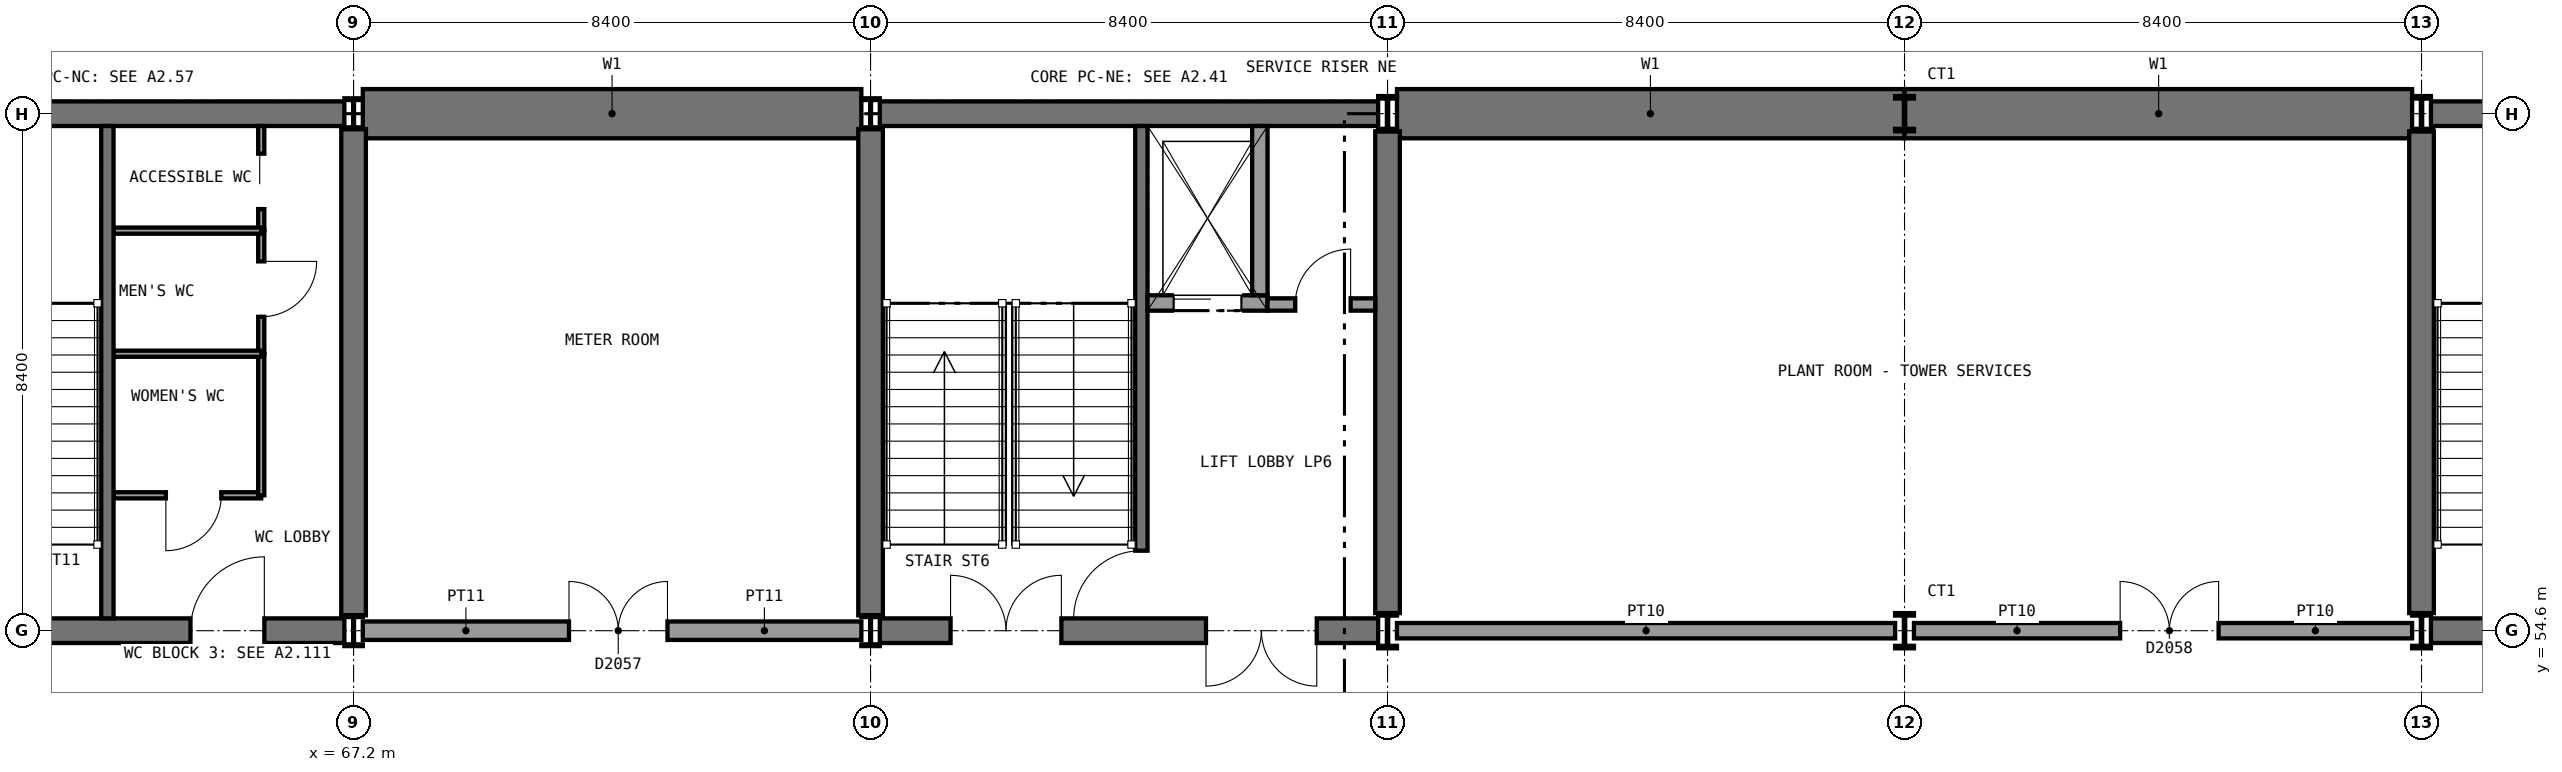
"""IFC4 building model, lengths in metres.
Left out: names, types, materials, properties, quantities, classifications, styles, units other than length and angle.
Written with IfcOpenShell. Run it as: python <this file> out.ifc"""

import sys

from ifc_helpers import new_model, si_unit, direction, frame, frame_2d, origin, origin_2d, place, context, subcontext, project, spatial, rectangle, i_section, extrude, element, fill, save


model = new_model("IFC4")
c1 = context("Model", 3, precision=1e-05, world=origin(), true_north=direction((0.0, 1.0)))
c2 = subcontext(c1, "Body", "Model", "MODEL_VIEW")
j1 = project(units=[si_unit("LENGTHUNIT", "METRE"), si_unit("PLANEANGLEUNIT", "RADIAN")], contexts=[c1])
p1 = place(None, origin())
s1 = spatial("IfcSite", under=j1, at=p1, CompositionType="ELEMENT")
p2 = place(p1, origin())
s2 = spatial("IfcBuilding", under=s1, at=p2, CompositionType="ELEMENT")
p3 = place(p2, frame((0.0, 0.0, -9.9)))
s3 = spatial("IfcBuildingStorey", under=s2, at=p3, CompositionType="ELEMENT", Elevation=-9.9)
p4 = place(p3, frame((67.35, 63.0, 0.0), z_axis=(0.0, 0.0, 1.0), x_axis=(1.0, 0.0, 0.0)))
e1 = element("IfcWall", 1, at=p4, inside=s3, PredefinedType="SOLIDWALL", context=c2, shape_type="SweptSolid", body=[
    extrude(rectangle(XDim=8.1, YDim=0.8, at=frame_2d((4.05, 0.0))), origin(), (0.0, 0.0, 1.0), 4.65),
])
p5 = place(p3, frame((84.153, 63.0, 0.0), z_axis=(0.0, 0.0, 1.0), x_axis=(1.0, 0.0, 0.0)))
e2 = element("IfcWall", 2, at=p5, inside=s3, PredefinedType="SOLIDWALL", context=c2, shape_type="SweptSolid", body=[
    extrude(rectangle(XDim=8.247, YDim=0.8, at=frame_2d((4.124, 0.0))), origin(), (0.0, 0.0, 1.0), 4.65),
])
p6 = place(p3, frame((92.4, 63.0, 0.0), z_axis=(0.0, 0.0, 1.0), x_axis=(1.0, 0.0, 0.0)))
e3 = element("IfcWall", 3, at=p6, inside=s3, PredefinedType="SOLIDWALL", context=c2, shape_type="SweptSolid", body=[
    extrude(rectangle(XDim=8.247, YDim=0.8, at=frame_2d((4.124, 0.0))), origin(), (0.0, 0.0, 1.0), 4.65),
])
p7 = place(p3, frame((75.75, 63.0, 0.0), z_axis=(0.0, 0.0, 1.0), x_axis=(1.0, 0.0, 0.0)))
e4 = element("IfcWall", 4, at=p7, inside=s3, PredefinedType="SHEAR", context=c2, shape_type="SweptSolid", body=[
    extrude(rectangle(XDim=8.097, YDim=0.4, at=frame_2d((4.048, 0.0))), origin(), (0.0, 0.0, 1.0), 4.65),
])
p8 = place(p3, frame((75.75, 54.6, 0.0), z_axis=(0.0, 0.0, 1.0), x_axis=(1.0, 0.0, 0.0)))
e5 = element("IfcWall", 5, at=p8, inside=s3, PredefinedType="SHEAR", context=c2, shape_type="SweptSolid", body=[
    extrude(rectangle(XDim=8.097, YDim=0.4, at=frame_2d((4.048, 0.0))), origin(), (0.0, 0.0, 1.0), 4.65),
])
p9 = place(p8, frame((1.15, 0.0, 0.0)))
e6 = element("IfcOpeningElement", 6, at=p9, cuts=e5, PredefinedType="OPENING", context=c2, shape_type="SweptSolid", body=[
    extrude(rectangle(XDim=1.8, YDim=2.1, at=frame_2d((0.9, 1.05))), frame((0.0, 0.21, 0.0), z_axis=(0.0, -1.0, 0.0), x_axis=(1.0, 0.0, 0.0)), (0.0, 0.0, 1.0), 0.42),
])
p10 = place(p8, frame((5.3, 0.0, 0.0)))
e7 = element("IfcOpeningElement", 7, at=p10, cuts=e5, PredefinedType="OPENING", context=c2, shape_type="SweptSolid", body=[
    extrude(rectangle(XDim=1.8, YDim=2.1, at=frame_2d((0.9, 1.05))), frame((0.0, 0.21, 0.0), z_axis=(0.0, -1.0, 0.0), x_axis=(1.0, 0.0, 0.0)), (0.0, 0.0, 1.0), 0.42),
])
p11 = place(p3, frame((75.6, 54.85, 0.0), z_axis=(0.0, 0.0, 1.0), x_axis=(0.0, 1.0, 0.0)))
e8 = element("IfcWall", 8, at=p11, inside=s3, PredefinedType="SHEAR", context=c2, shape_type="SweptSolid", body=[
    extrude(rectangle(XDim=7.9, YDim=0.4, at=frame_2d((3.95, 0.0))), origin(), (0.0, 0.0, 1.0), 4.65),
])
p12 = place(p3, frame((84.0, 54.886, 0.0), z_axis=(0.0, 0.0, 1.0), x_axis=(0.0, 1.0, 0.0)))
e9 = element("IfcWall", 9, at=p12, inside=s3, PredefinedType="SHEAR", context=c2, shape_type="SweptSolid", body=[
    extrude(rectangle(XDim=7.828, YDim=0.4, at=frame_2d((3.914, 0.0))), origin(), (0.0, 0.0, 1.0), 4.65),
])
p13 = place(p3, frame((58.95, 63.0, 0.0), z_axis=(0.0, 0.0, 1.0), x_axis=(1.0, 0.0, 0.0)))
e10 = element("IfcWall", 10, at=p13, inside=s3, PredefinedType="SHEAR", context=c2, shape_type="SweptSolid", body=[
    extrude(rectangle(XDim=8.1, YDim=0.4, at=frame_2d((4.05, 0.0))), origin(), (0.0, 0.0, 1.0), 4.65),
])
p14 = place(p3, frame((58.95, 54.6, 0.0), z_axis=(0.0, 0.0, 1.0), x_axis=(1.0, 0.0, 0.0)))
e11 = element("IfcWall", 11, at=p14, inside=s3, PredefinedType="SHEAR", context=c2, shape_type="SweptSolid", body=[
    extrude(rectangle(XDim=8.1, YDim=0.4, at=frame_2d((4.05, 0.0))), origin(), (0.0, 0.0, 1.0), 4.65),
])
p15 = place(p14, frame((1.15, 0.0, 0.0)))
e12 = element("IfcOpeningElement", 12, at=p15, cuts=e11, PredefinedType="OPENING", context=c2, shape_type="SweptSolid", body=[
    extrude(rectangle(XDim=1.8, YDim=2.1, at=frame_2d((0.9, 1.05))), frame((0.0, 0.21, 0.0), z_axis=(0.0, -1.0, 0.0), x_axis=(1.0, 0.0, 0.0)), (0.0, 0.0, 1.0), 0.42),
])
p16 = place(p14, frame((5.6, 0.0, 0.0)))
e13 = element("IfcOpeningElement", 13, at=p16, cuts=e11, PredefinedType="OPENING", context=c2, shape_type="SweptSolid", body=[
    extrude(rectangle(XDim=1.2, YDim=2.1, at=frame_2d((0.6, 1.05))), frame((0.0, 0.21, 0.0), z_axis=(0.0, -1.0, 0.0), x_axis=(1.0, 0.0, 0.0)), (0.0, 0.0, 1.0), 0.42),
])
p17 = place(p3, frame((67.2, 54.85, 0.0), z_axis=(0.0, 0.0, 1.0), x_axis=(0.0, 1.0, 0.0)))
e14 = element("IfcWall", 14, at=p17, inside=s3, PredefinedType="SHEAR", context=c2, shape_type="SweptSolid", body=[
    extrude(rectangle(XDim=7.9, YDim=0.4, at=frame_2d((3.95, 0.0))), origin(), (0.0, 0.0, 1.0), 4.65),
])
p18 = place(p3, frame((100.953, 63.0, 0.0), z_axis=(0.0, 0.0, 1.0), x_axis=(1.0, 0.0, 0.0)))
e15 = element("IfcWall", 15, at=p18, inside=s3, PredefinedType="SHEAR", context=c2, shape_type="SweptSolid", body=[
    extrude(rectangle(XDim=16.361, YDim=0.4, at=frame_2d((8.181, 0.0))), origin(), (0.0, 0.0, 1.0), 4.65),
])
p19 = place(p3, frame((100.953, 54.6, 0.0), z_axis=(0.0, 0.0, 1.0), x_axis=(1.0, 0.0, 0.0)))
e16 = element("IfcWall", 16, at=p19, inside=s3, PredefinedType="SHEAR", context=c2, shape_type="SweptSolid", body=[
    extrude(rectangle(XDim=16.361, YDim=0.4, at=frame_2d((8.181, 0.0))), origin(), (0.0, 0.0, 1.0), 4.65),
])
p20 = place(p19, frame((7.047, 0.0, 0.0)))
e17 = element("IfcOpeningElement", 17, at=p20, cuts=e16, PredefinedType="OPENING", context=c2, shape_type="SweptSolid", body=[
    extrude(rectangle(XDim=2.4, YDim=2.4, at=frame_2d((1.2, 1.2))), frame((0.0, 0.21, 0.0), z_axis=(0.0, -1.0, 0.0), x_axis=(1.0, 0.0, 0.0)), (0.0, 0.0, 1.0), 0.42),
])
p21 = place(p3, frame((100.8, 54.886, 0.0), z_axis=(0.0, 0.0, 1.0), x_axis=(0.0, 1.0, 0.0)))
e18 = element("IfcWall", 18, at=p21, inside=s3, PredefinedType="SHEAR", context=c2, shape_type="SweptSolid", body=[
    extrude(rectangle(XDim=7.828, YDim=0.4, at=frame_2d((3.914, 0.0))), origin(), (0.0, 0.0, 1.0), 4.65),
])
for number, where, z_axis, x_axis in (
    (19, (67.2, 54.6, 0.0), (0.0, 0.0, 1.0), (1.0, 0.0, 0.0)),
    (20, (67.2, 63.0, 0.0), (0.0, 0.0, 1.0), (1.0, 0.0, 0.0)),
    (21, (75.6, 54.6, 0.0), (0.0, 0.0, 1.0), (1.0, 0.0, 0.0)),
    (22, (75.6, 63.0, 0.0), (0.0, 0.0, 1.0), (1.0, 0.0, 0.0)),
):
    element("IfcColumn", number, at=place(p3, frame(where, z_axis=z_axis, x_axis=x_axis)), inside=s3, PredefinedType="COLUMN", context=c2, shape_type="SweptSolid", body=[
        extrude(i_section(OverallWidth=0.3, OverallDepth=0.5, WebThickness=0.014, FlangeThickness=0.028, FilletRadius=0.027, at=origin_2d()), origin(), (0.0, 0.0, 1.0), 5.0),
    ])
for number, where, z_axis, x_axis in (
    (23, (84.0, 54.6, 0.0), (0.0, 0.0, 1.0), (1.0, 0.0, 0.0)),
    (24, (84.0, 63.0, 0.0), (0.0, 0.0, 1.0), (1.0, 0.0, 0.0)),
    (25, (92.4, 54.6, 0.0), (0.0, 0.0, 1.0), (1.0, 0.0, 0.0)),
    (26, (92.4, 63.0, 0.0), (0.0, 0.0, 1.0), (1.0, 0.0, 0.0)),
    (27, (100.8, 54.6, 0.0), (0.0, 0.0, 1.0), (1.0, 0.0, 0.0)),
    (28, (100.8, 63.0, 0.0), (0.0, 0.0, 1.0), (1.0, 0.0, 0.0)),
):
    element("IfcColumn", number, at=place(p3, frame(where, z_axis=z_axis, x_axis=x_axis)), inside=s3, PredefinedType="COLUMN", context=c2, shape_type="SweptSolid", body=[
        extrude(i_section(OverallWidth=0.306, OverallDepth=0.572, WebThickness=0.021, FlangeThickness=0.04, FilletRadius=0.027, at=origin_2d()), origin(), (0.0, 0.0, 1.0), 5.0),
    ])
p22 = place(p3, frame((63.3, 56.8, 0.0), z_axis=(0.0, 0.0, 1.0), x_axis=(1.0, 0.0, 0.0)))
e29 = element("IfcWall", 29, at=p22, inside=s3, PredefinedType="PARTITIONING", context=c2, shape_type="SweptSolid", body=[
    extrude(rectangle(XDim=2.4, YDim=0.1, at=frame_2d((1.2, 0.0))), origin(), (0.0, 0.0, 1.0), 4.78),
])
p23 = place(p22, frame((0.85, 0.0, 0.0)))
e30 = element("IfcOpeningElement", 30, at=p23, cuts=e29, PredefinedType="OPENING", context=c2, shape_type="SweptSolid", body=[
    extrude(rectangle(XDim=0.9, YDim=2.1, at=frame_2d((0.45, 1.05))), frame((0.0, 0.06, 0.0), z_axis=(0.0, -1.0, 0.0), x_axis=(1.0, 0.0, 0.0)), (0.0, 0.0, 1.0), 0.12),
])
p24 = place(p3, frame((65.7, 56.8, 0.0), z_axis=(0.0, 0.0, 1.0), x_axis=(0.0, 1.0, 0.0)))
e31 = element("IfcWall", 31, at=p24, inside=s3, PredefinedType="PARTITIONING", context=c2, shape_type="SweptSolid", body=[
    extrude(rectangle(XDim=2.3, YDim=0.1, at=frame_2d((1.15, 0.0))), origin(), (0.0, 0.0, 1.0), 4.78),
])
p25 = place(p3, frame((65.7, 59.1, 0.0), z_axis=(0.0, 0.0, 1.0), x_axis=(0.0, 1.0, 0.0)))
e32 = element("IfcWall", 32, at=p25, inside=s3, PredefinedType="PARTITIONING", context=c2, shape_type="SweptSolid", body=[
    extrude(rectangle(XDim=2.0, YDim=0.1, at=frame_2d((1.0, 0.0))), origin(), (0.0, 0.0, 1.0), 4.78),
])
p26 = place(p25, frame((0.6, 0.0, 0.0)))
e33 = element("IfcOpeningElement", 33, at=p26, cuts=e32, PredefinedType="OPENING", context=c2, shape_type="SweptSolid", body=[
    extrude(rectangle(XDim=0.9, YDim=2.1, at=frame_2d((0.45, 1.05))), frame((0.0, 0.06, 0.0), z_axis=(0.0, -1.0, 0.0), x_axis=(1.0, 0.0, 0.0)), (0.0, 0.0, 1.0), 0.12),
])
p27 = place(p3, frame((65.7, 61.1, 0.0), z_axis=(0.0, 0.0, 1.0), x_axis=(0.0, 1.0, 0.0)))
e34 = element("IfcWall", 34, at=p27, inside=s3, PredefinedType="PARTITIONING", context=c2, shape_type="SweptSolid", body=[
    extrude(rectangle(XDim=1.7, YDim=0.1, at=frame_2d((0.85, 0.0))), origin(), (0.0, 0.0, 1.0), 4.78),
])
p28 = place(p27, frame((0.35, 0.0, 0.0)))
e35 = element("IfcOpeningElement", 35, at=p28, cuts=e34, PredefinedType="OPENING", context=c2, shape_type="SweptSolid", body=[
    extrude(rectangle(XDim=0.9, YDim=2.1, at=frame_2d((0.45, 1.05))), frame((0.0, 0.06, 0.0), z_axis=(0.0, -1.0, 0.0), x_axis=(1.0, 0.0, 0.0)), (0.0, 0.0, 1.0), 0.12),
])
for number, where, z_axis, x_axis in (
    (36, (63.3, 59.1, 0.0), (0.0, 0.0, 1.0), (1.0, 0.0, 0.0)),
    (37, (63.3, 61.1, 0.0), (0.0, 0.0, 1.0), (1.0, 0.0, 0.0)),
):
    element("IfcWall", number, at=place(p3, frame(where, z_axis=z_axis, x_axis=x_axis)), inside=s3, PredefinedType="PARTITIONING", context=c2, shape_type="SweptSolid", body=[
        extrude(rectangle(XDim=2.4, YDim=0.1, at=frame_2d((1.2, 0.0))), origin(), (0.0, 0.0, 1.0), 4.78),
    ])
p29 = place(p3, frame((67.35, 54.6, 0.0), z_axis=(0.0, 0.0, 1.0), x_axis=(1.0, 0.0, 0.0)))
e38 = element("IfcWall", 38, at=p29, inside=s3, PredefinedType="SOLIDWALL", context=c2, shape_type="SweptSolid", body=[
    extrude(rectangle(XDim=8.1, YDim=0.3, at=frame_2d((4.05, 0.0))), origin(), (0.0, 0.0, 1.0), 4.65),
])
p30 = place(p29, frame((3.35, 0.0, 0.0)))
e39 = element("IfcOpeningElement", 39, at=p30, cuts=e38, PredefinedType="OPENING", context=c2, shape_type="SweptSolid", body=[
    extrude(rectangle(XDim=1.6, YDim=2.2, at=frame_2d((0.8, 1.1))), frame((0.0, 0.16, 0.0), z_axis=(0.0, -1.0, 0.0), x_axis=(1.0, 0.0, 0.0)), (0.0, 0.0, 1.0), 0.32),
])
p31 = place(p3, frame((84.153, 54.6, 0.0), z_axis=(0.0, 0.0, 1.0), x_axis=(1.0, 0.0, 0.0)))
e40 = element("IfcWall", 40, at=p31, inside=s3, PredefinedType="SOLIDWALL", context=c2, shape_type="SweptSolid", body=[
    extrude(rectangle(XDim=8.094, YDim=0.25, at=frame_2d((4.047, 0.0))), origin(), (0.0, 0.0, 1.0), 4.65),
])
p32 = place(p3, frame((92.553, 54.6, 0.0), z_axis=(0.0, 0.0, 1.0), x_axis=(1.0, 0.0, 0.0)))
e41 = element("IfcWall", 41, at=p32, inside=s3, PredefinedType="SOLIDWALL", context=c2, shape_type="SweptSolid", body=[
    extrude(rectangle(XDim=8.094, YDim=0.25, at=frame_2d((4.047, 0.0))), origin(), (0.0, 0.0, 1.0), 4.65),
])
p33 = place(p32, frame((3.35, 0.0, 0.0)))
e42 = element("IfcOpeningElement", 42, at=p33, cuts=e41, PredefinedType="OPENING", context=c2, shape_type="SweptSolid", body=[
    extrude(rectangle(XDim=1.6, YDim=2.2, at=frame_2d((0.8, 1.1))), frame((0.0, 0.135, 0.0), z_axis=(0.0, -1.0, 0.0), x_axis=(1.0, 0.0, 0.0)), (0.0, 0.0, 1.0), 0.27),
])
p34 = place(p3, frame((80.0, 62.8, 0.0), z_axis=(0.0, 0.0, 1.0), x_axis=(0.0, -1.0, 0.0)))
e43 = element("IfcWall", 43, at=p34, inside=s3, PredefinedType="SHEAR", context=c2, shape_type="SweptSolid", body=[
    extrude(rectangle(XDim=8.0, YDim=0.2, at=frame_2d((4.0, 0.0))), origin(), (0.0, 0.0, 1.0), 4.65),
])
p35 = place(p34, frame((6.9, 0.0, 0.0)))
e44 = element("IfcOpeningElement", 44, at=p35, cuts=e43, PredefinedType="OPENING", context=c2, shape_type="SweptSolid", body=[
    extrude(rectangle(XDim=1.11, YDim=2.1, at=frame_2d((0.555, 1.05))), frame((0.0, 0.11, 0.0), z_axis=(0.0, -1.0, 0.0), x_axis=(1.0, 0.0, 0.0)), (0.0, 0.0, 1.0), 0.22),
])
p36 = place(p3, frame((80.1, 59.925, -1.4), z_axis=(0.0, 0.0, 1.0), x_axis=(1.0, 0.0, 0.0)))
e45 = element("IfcWall", 45, at=p36, inside=s3, PredefinedType="SOLIDWALL", context=c2, shape_type="SweptSolid", body=[
    extrude(rectangle(XDim=1.95, YDim=0.25, at=frame_2d((0.975, 0.0))), origin(), (0.0, 0.0, 1.0), 6.4),
])
p37 = place(p36, frame((0.425, 0.0, 1.4)))
e46 = element("IfcOpeningElement", 46, at=p37, cuts=e45, PredefinedType="OPENING", context=c2, shape_type="SweptSolid", body=[
    extrude(rectangle(XDim=1.1, YDim=2.1, at=frame_2d((0.55, 1.05))), frame((0.0, 0.135, 0.0), z_axis=(0.0, -1.0, 0.0), x_axis=(1.0, 0.0, 0.0)), (0.0, 0.0, 1.0), 0.27),
])
p38 = place(p3, frame((81.925, 62.8, -1.4), z_axis=(0.0, 0.0, 1.0), x_axis=(0.0, -1.0, 0.0)))
e47 = element("IfcWall", 47, at=p38, inside=s3, PredefinedType="SOLIDWALL", context=c2, shape_type="SweptSolid", body=[
    extrude(rectangle(XDim=2.75, YDim=0.25, at=frame_2d((1.375, 0.0))), origin(), (0.0, 0.0, 1.0), 6.4),
])
p39 = place(p3, frame((82.05, 59.9, 0.0), z_axis=(0.0, 0.0, 1.0), x_axis=(1.0, 0.0, 0.0)))
e48 = element("IfcWall", 48, at=p39, inside=s3, PredefinedType="PARTITIONING", context=c2, shape_type="SweptSolid", body=[
    extrude(rectangle(XDim=1.75, YDim=0.2, at=frame_2d((0.875, 0.0))), origin(), (0.0, 0.0, 1.0), 4.65),
])
p40 = place(p39, frame((0.45, 0.0, 0.0)))
e49 = element("IfcOpeningElement", 49, at=p40, cuts=e48, PredefinedType="OPENING", context=c2, shape_type="SweptSolid", body=[
    extrude(rectangle(XDim=0.9, YDim=2.1, at=frame_2d((0.45, 1.05))), frame((0.0, 0.11, 0.0), z_axis=(0.0, -1.0, 0.0), x_axis=(1.0, 0.0, 0.0)), (0.0, 0.0, 1.0), 0.22),
])
p41 = place(p3, frame((63.2, 62.8, 0.0), z_axis=(0.0, 0.0, 1.0), x_axis=(0.0, -1.0, 0.0)))
e50 = element("IfcWall", 50, at=p41, inside=s3, PredefinedType="SHEAR", context=c2, shape_type="SweptSolid", body=[
    extrude(rectangle(XDim=8.0, YDim=0.2, at=frame_2d((4.0, 0.0))), origin(), (0.0, 0.0, 1.0), 4.65),
])
p42 = place(p23, frame((0.9, 0.0, 0.0), z_axis=(0.0, 0.0, 1.0), x_axis=(-1.0, 0.0, 0.0)))
e51 = element("IfcDoor", 51, at=p42, inside=s3, OperationType="SINGLE_SWING_RIGHT", PredefinedType="DOOR", context=c2, shape_type="SweptSolid", body=[
    extrude(rectangle(XDim=0.9, YDim=2.1, at=frame_2d((0.45, 1.05))), frame((0.0, 0.025, 0.0), z_axis=(0.0, -1.0, 0.0), x_axis=(1.0, 0.0, 0.0)), (0.0, 0.0, 1.0), 0.05),
])
fill(e30, e51)
p43 = place(p26, frame((0.9, 0.0, 0.0), z_axis=(0.0, 0.0, 1.0), x_axis=(-1.0, 0.0, 0.0)))
e52 = element("IfcDoor", 52, at=p43, inside=s3, OperationType="SINGLE_SWING_LEFT", PredefinedType="DOOR", context=c2, shape_type="SweptSolid", body=[
    extrude(rectangle(XDim=0.9, YDim=2.1, at=frame_2d((0.45, 1.05))), frame((0.0, 0.025, 0.0), z_axis=(0.0, -1.0, 0.0), x_axis=(1.0, 0.0, 0.0)), (0.0, 0.0, 1.0), 0.05),
])
fill(e33, e52)
p44 = place(p28, origin())
e53 = element("IfcDoor", 53, at=p44, inside=s3, OperationType="SLIDING_TO_RIGHT", PredefinedType="DOOR", context=c2, shape_type="SweptSolid", body=[
    extrude(rectangle(XDim=0.9, YDim=2.1, at=frame_2d((0.45, 1.05))), frame((0.0, 0.025, 0.0), z_axis=(0.0, -1.0, 0.0), x_axis=(1.0, 0.0, 0.0)), (0.0, 0.0, 1.0), 0.05),
])
fill(e35, e53)
p45 = place(p30, origin())
e54 = element("IfcDoor", 54, at=p45, inside=s3, OperationType="DOUBLE_DOOR_SINGLE_SWING", PredefinedType="DOOR", context=c2, shape_type="SweptSolid", body=[
    extrude(rectangle(XDim=1.6, YDim=2.2, at=frame_2d((0.8, 1.1))), frame((0.0, 0.025, 0.0), z_axis=(0.0, -1.0, 0.0), x_axis=(1.0, 0.0, 0.0)), (0.0, 0.0, 1.0), 0.05),
])
fill(e39, e54)
p46 = place(p33, origin())
e55 = element("IfcDoor", 55, at=p46, inside=s3, OperationType="DOUBLE_DOOR_SINGLE_SWING", PredefinedType="DOOR", context=c2, shape_type="SweptSolid", body=[
    extrude(rectangle(XDim=1.6, YDim=2.2, at=frame_2d((0.8, 1.1))), frame((0.0, 0.025, 0.0), z_axis=(0.0, -1.0, 0.0), x_axis=(1.0, 0.0, 0.0)), (0.0, 0.0, 1.0), 0.05),
])
fill(e42, e55)
p47 = place(p35, frame((1.1, 0.0, 0.0), z_axis=(0.0, 0.0, 1.0), x_axis=(-1.0, 0.0, 0.0)))
e56 = element("IfcDoor", 56, at=p47, inside=s3, OperationType="SINGLE_SWING_LEFT", PredefinedType="DOOR", context=c2, shape_type="SweptSolid", body=[
    extrude(rectangle(XDim=1.1, YDim=2.1, at=frame_2d((0.55, 1.05))), frame((0.0, 0.025, 0.0), z_axis=(0.0, -1.0, 0.0), x_axis=(1.0, 0.0, 0.0)), (0.0, 0.0, 1.0), 0.05),
])
fill(e44, e56)
p48 = place(p37, frame((1.1, 0.0, 0.0), z_axis=(0.0, 0.0, 1.0), x_axis=(-1.0, 0.0, 0.0)))
e57 = element("IfcDoor", 57, at=p48, inside=s3, OperationType="SLIDING_TO_RIGHT", PredefinedType="DOOR", context=c2, shape_type="SweptSolid", body=[
    extrude(rectangle(XDim=1.1, YDim=2.1, at=frame_2d((0.55, 1.05))), frame((0.0, 0.025, 0.0), z_axis=(0.0, -1.0, 0.0), x_axis=(1.0, 0.0, 0.0)), (0.0, 0.0, 1.0), 0.05),
])
fill(e46, e57)
p49 = place(p40, origin())
e58 = element("IfcDoor", 58, at=p49, inside=s3, OperationType="SINGLE_SWING_RIGHT", PredefinedType="DOOR", context=c2, shape_type="SweptSolid", body=[
    extrude(rectangle(XDim=0.9, YDim=2.1, at=frame_2d((0.45, 1.05))), frame((0.0, 0.025, 0.0), z_axis=(0.0, -1.0, 0.0), x_axis=(1.0, 0.0, 0.0)), (0.0, 0.0, 1.0), 0.05),
])
fill(e49, e58)
p50 = place(p9, origin())
e59 = element("IfcDoor", 59, at=p50, inside=s3, OperationType="DOUBLE_DOOR_SINGLE_SWING", PredefinedType="DOOR", context=c2, shape_type="SweptSolid", body=[
    extrude(rectangle(XDim=1.8, YDim=2.1, at=frame_2d((0.9, 1.05))), frame((0.0, 0.025, 0.0), z_axis=(0.0, -1.0, 0.0), x_axis=(1.0, 0.0, 0.0)), (0.0, 0.0, 1.0), 0.05),
])
fill(e6, e59)
p51 = place(p10, frame((1.8, 0.0, 0.0), z_axis=(0.0, 0.0, 1.0), x_axis=(-1.0, 0.0, 0.0)))
e60 = element("IfcDoor", 60, at=p51, inside=s3, OperationType="DOUBLE_DOOR_SINGLE_SWING", PredefinedType="DOOR", context=c2, shape_type="SweptSolid", body=[
    extrude(rectangle(XDim=1.8, YDim=2.1, at=frame_2d((0.9, 1.05))), frame((0.0, 0.025, 0.0), z_axis=(0.0, -1.0, 0.0), x_axis=(1.0, 0.0, 0.0)), (0.0, 0.0, 1.0), 0.05),
])
fill(e7, e60)
p52 = place(p16, origin())
e61 = element("IfcDoor", 61, at=p52, inside=s3, OperationType="SINGLE_SWING_RIGHT", PredefinedType="DOOR", context=c2, shape_type="SweptSolid", body=[
    extrude(rectangle(XDim=1.2, YDim=2.1, at=frame_2d((0.6, 1.05))), frame((0.0, 0.025, 0.0), z_axis=(0.0, -1.0, 0.0), x_axis=(1.0, 0.0, 0.0)), (0.0, 0.0, 1.0), 0.05),
])
fill(e13, e61)
save(model, sys.argv[1])
